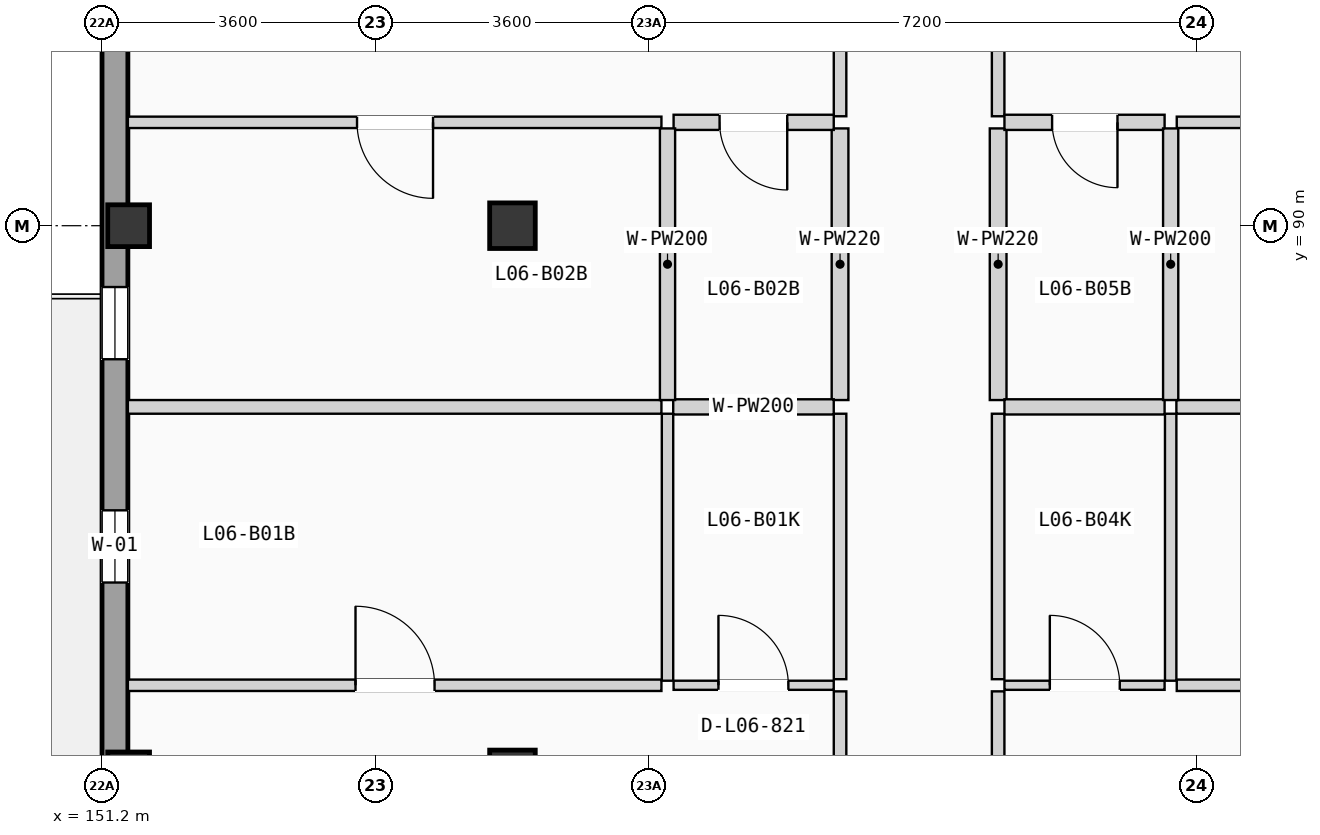
"""IFC4 building model, lengths in metres.
Left out: names, types, materials, properties, quantities, classifications, styles, units other than length and angle.
Written with IfcOpenShell. Run it as: python <this file> out.ifc"""

import sys

from ifc_helpers import new_model, si_unit, direction, frame, frame_2d, origin, origin_2d, place, context, subcontext, project, spatial, rectangle, extrude, element, fill, save


model = new_model("IFC4")
c1 = context("Model", 3, precision=1e-05, world=origin(), true_north=direction((0.0, 1.0)))
c2 = subcontext(c1, "Body", "Model", "MODEL_VIEW")
j1 = project(units=[si_unit("LENGTHUNIT", "METRE"), si_unit("PLANEANGLEUNIT", "RADIAN")], contexts=[c1])
p1 = place(None, origin())
s1 = spatial("IfcSite", under=j1, at=p1, CompositionType="ELEMENT")
p2 = place(p1, origin())
s2 = spatial("IfcBuilding", under=s1, at=p2, CompositionType="ELEMENT")
p3 = place(p2, frame((0.0, 0.0, 21.525)))
s3 = spatial("IfcBuildingStorey", under=s2, at=p3, CompositionType="ELEMENT", Elevation=21.525)
for number, where, z_axis, x_axis in (
    (1, (151.55, 82.8, 0.0), (0.0, 0.0, 1.0), (1.0, 0.0, 0.0)),
    (2, (151.55, 90.0, 0.0), (0.0, 0.0, 1.0), (1.0, 0.0, 0.0)),
):
    element("IfcColumn", number, at=place(p3, frame(where, z_axis=z_axis, x_axis=x_axis)), inside=s3, PredefinedType="COLUMN", context=c2, shape_type="SweptSolid", body=[
        extrude(rectangle(XDim=0.55, YDim=0.55, at=origin_2d()), origin(), (0.0, 0.0, 1.0), 3.15),
    ])
for number, where, z_axis, x_axis in (
    (3, (156.6, 82.8, 0.0), (0.0, 0.0, 1.0), (1.0, 0.0, 0.0)),
    (4, (156.6, 90.0, 0.0), (0.0, 0.0, 1.0), (1.0, 0.0, 0.0)),
):
    element("IfcColumn", number, at=place(p3, frame(where, z_axis=z_axis, x_axis=x_axis)), inside=s3, PredefinedType="COLUMN", context=c2, shape_type="SweptSolid", body=[
        extrude(rectangle(XDim=0.6, YDim=0.6, at=origin_2d()), origin(), (0.0, 0.0, 1.0), 3.15),
    ])
p4 = place(p3, frame((151.37, 68.74, 0.0), z_axis=(0.0, 0.0, 1.0), x_axis=(0.0, 1.0, 0.0)))
e5 = element("IfcWall", 5, at=p4, inside=s3, PredefinedType="SOLIDWALL", context=c2, shape_type="SweptSolid", body=[
    extrude(rectangle(XDim=49.72, YDim=0.34, at=frame_2d((24.86, 0.0))), origin(), (0.0, 0.0, 1.0), 2.89),
])
p5 = place(p4, frame((11.462, 0.0, 0.0)))
e6 = element("IfcOpeningElement", 6, at=p5, cuts=e5, PredefinedType="OPENING", context=c2, shape_type="SweptSolid", body=[
    extrude(rectangle(XDim=0.95, YDim=2.15, at=frame_2d((0.475, 1.075))), frame((0.0, 0.18, 0.0), z_axis=(0.0, -1.0, 0.0), x_axis=(1.0, 0.0, 0.0)), (0.0, 0.0, 1.0), 0.36),
])
p6 = place(p4, frame((8.082, 0.0, 0.555)))
e7 = element("IfcOpeningElement", 7, at=p6, cuts=e5, PredefinedType="OPENING", context=c2, shape_type="SweptSolid", body=[
    extrude(rectangle(XDim=1.85, YDim=1.65, at=frame_2d((0.925, 0.825))), frame((0.0, 0.18, 0.0), z_axis=(0.0, -1.0, 0.0), x_axis=(1.0, 0.0, 0.0)), (0.0, 0.0, 1.0), 0.36),
])
p7 = place(p4, frame((16.565, 0.0, 0.85)))
e8 = element("IfcOpeningElement", 8, at=p7, cuts=e5, PredefinedType="OPENING", context=c2, shape_type="SweptSolid", body=[
    extrude(rectangle(XDim=0.95, YDim=1.2, at=frame_2d((0.475, 0.6))), frame((0.0, 0.18, 0.0), z_axis=(0.0, -1.0, 0.0), x_axis=(1.0, 0.0, 0.0)), (0.0, 0.0, 1.0), 0.36),
])
p8 = place(p4, frame((23.86, 0.0, 0.9)))
e9 = element("IfcOpeningElement", 9, at=p8, cuts=e5, PredefinedType="OPENING", context=c2, shape_type="SweptSolid", body=[
    extrude(rectangle(XDim=2.0, YDim=1.2, at=frame_2d((1.0, 0.6))), frame((0.0, 0.18, 0.0), z_axis=(0.0, -1.0, 0.0), x_axis=(1.0, 0.0, 0.0)), (0.0, 0.0, 1.0), 0.36),
])
p9 = place(p4, frame((19.503, 0.0, 0.85)))
e10 = element("IfcOpeningElement", 10, at=p9, cuts=e5, PredefinedType="OPENING", context=c2, shape_type="SweptSolid", body=[
    extrude(rectangle(XDim=0.95, YDim=1.2, at=frame_2d((0.475, 0.6))), frame((0.0, 0.18, 0.0), z_axis=(0.0, -1.0, 0.0), x_axis=(1.0, 0.0, 0.0)), (0.0, 0.0, 1.0), 0.36),
])
p10 = place(p4, frame((29.267, 0.0, 0.85)))
e11 = element("IfcOpeningElement", 11, at=p10, cuts=e5, PredefinedType="OPENING", context=c2, shape_type="SweptSolid", body=[
    extrude(rectangle(XDim=0.95, YDim=1.2, at=frame_2d((0.475, 0.6))), frame((0.0, 0.18, 0.0), z_axis=(0.0, -1.0, 0.0), x_axis=(1.0, 0.0, 0.0)), (0.0, 0.0, 1.0), 0.36),
])
p11 = place(p4, frame((37.243, 0.0, 0.0)))
e12 = element("IfcOpeningElement", 12, at=p11, cuts=e5, PredefinedType="OPENING", context=c2, shape_type="SweptSolid", body=[
    extrude(rectangle(XDim=1.08, YDim=2.18, at=frame_2d((0.54, 1.09))), frame((0.0, 0.18, 0.0), z_axis=(0.0, -1.0, 0.0), x_axis=(1.0, 0.0, 0.0)), (0.0, 0.0, 1.0), 0.36),
])
p12 = place(p4, frame((31.681, 0.0, 0.555)))
e13 = element("IfcOpeningElement", 13, at=p12, cuts=e5, PredefinedType="OPENING", context=c2, shape_type="SweptSolid", body=[
    extrude(rectangle(XDim=2.0, YDim=1.65, at=frame_2d((1.0, 0.825))), frame((0.0, 0.18, 0.0), z_axis=(0.0, -1.0, 0.0), x_axis=(1.0, 0.0, 0.0)), (0.0, 0.0, 1.0), 0.36),
])
p13 = place(p4, frame((40.239, 0.0, 0.85)))
e14 = element("IfcOpeningElement", 14, at=p13, cuts=e5, PredefinedType="OPENING", context=c2, shape_type="SweptSolid", body=[
    extrude(rectangle(XDim=0.95, YDim=1.2, at=frame_2d((0.475, 0.6))), frame((0.0, 0.18, 0.0), z_axis=(0.0, -1.0, 0.0), x_axis=(1.0, 0.0, 0.0)), (0.0, 0.0, 1.0), 0.36),
])
p14 = place(p3, frame((160.91, 79.653, 0.0), z_axis=(0.0, 0.0, 1.0), x_axis=(0.0, 1.0, 0.0)))
e15 = element("IfcWall", 15, at=p14, inside=s3, PredefinedType="PARTITIONING", context=c2, shape_type="SweptSolid", body=[
    extrude(rectangle(XDim=4.22, YDim=0.165, at=frame_2d((2.11, 0.0))), origin(), (0.0, 0.0, 1.0), 2.87),
])
p15 = place(p14, frame((1.605, 0.0, 0.0)))
e16 = element("IfcOpeningElement", 16, at=p15, cuts=e15, PredefinedType="OPENING", context=c2, shape_type="SweptSolid", body=[
    extrude(rectangle(XDim=1.01, YDim=2.11, at=frame_2d((0.505, 1.055))), frame((0.0, 0.093, 0.0), z_axis=(0.0, -1.0, 0.0), x_axis=(1.0, 0.0, 0.0)), (0.0, 0.0, 1.0), 0.185),
])
p16 = place(p3, frame((160.91, 84.033, 0.0), z_axis=(0.0, 0.0, 1.0), x_axis=(0.0, 1.0, 0.0)))
e17 = element("IfcWall", 17, at=p16, inside=s3, PredefinedType="PARTITIONING", context=c2, shape_type="SweptSolid", body=[
    extrude(rectangle(XDim=3.493, YDim=0.165, at=frame_2d((1.747, 0.0))), origin(), (0.0, 0.0, 1.0), 2.87),
])
p17 = place(p3, frame((160.91, 91.44, 0.0), z_axis=(0.0, 0.0, 1.0), x_axis=(0.0, 1.0, 0.0)))
e18 = element("IfcWall", 18, at=p17, inside=s3, PredefinedType="PARTITIONING", context=c2, shape_type="SweptSolid", body=[
    extrude(rectangle(XDim=4.32, YDim=0.165, at=frame_2d((2.16, 0.0))), origin(), (0.0, 0.0, 1.0), 2.87),
])
p18 = place(p17, frame((1.655, 0.0, 0.0)))
e19 = element("IfcOpeningElement", 19, at=p18, cuts=e18, PredefinedType="OPENING", context=c2, shape_type="SweptSolid", body=[
    extrude(rectangle(XDim=1.01, YDim=2.11, at=frame_2d((0.505, 1.055))), frame((0.0, 0.093, 0.0), z_axis=(0.0, -1.0, 0.0), x_axis=(1.0, 0.0, 0.0)), (0.0, 0.0, 1.0), 0.185),
])
p19 = place(p3, frame((160.91, 87.706, 0.0), z_axis=(0.0, 0.0, 1.0), x_axis=(0.0, 1.0, 0.0)))
e20 = element("IfcWall", 20, at=p19, inside=s3, PredefinedType="PLUMBINGWALL", context=c2, shape_type="SweptSolid", body=[
    extrude(rectangle(XDim=3.574, YDim=0.22, at=frame_2d((1.787, 0.0))), origin(), (0.0, 0.0, 1.0), 2.87),
])
p20 = place(p3, frame((162.99, 79.653, 0.0), z_axis=(0.0, 0.0, 1.0), x_axis=(0.0, 1.0, 0.0)))
e21 = element("IfcWall", 21, at=p20, inside=s3, PredefinedType="PARTITIONING", context=c2, shape_type="SweptSolid", body=[
    extrude(rectangle(XDim=4.22, YDim=0.165, at=frame_2d((2.11, 0.0))), origin(), (0.0, 0.0, 1.0), 2.87),
])
p21 = place(p20, frame((1.605, 0.0, 0.0)))
e22 = element("IfcOpeningElement", 22, at=p21, cuts=e21, PredefinedType="OPENING", context=c2, shape_type="SweptSolid", body=[
    extrude(rectangle(XDim=1.01, YDim=2.11, at=frame_2d((0.505, 1.055))), frame((0.0, 0.093, 0.0), z_axis=(0.0, -1.0, 0.0), x_axis=(1.0, 0.0, 0.0)), (0.0, 0.0, 1.0), 0.185),
])
p22 = place(p3, frame((162.99, 84.033, 0.0), z_axis=(0.0, 0.0, 1.0), x_axis=(0.0, 1.0, 0.0)))
e23 = element("IfcWall", 23, at=p22, inside=s3, PredefinedType="PARTITIONING", context=c2, shape_type="SweptSolid", body=[
    extrude(rectangle(XDim=3.493, YDim=0.165, at=frame_2d((1.747, 0.0))), origin(), (0.0, 0.0, 1.0), 2.87),
])
p23 = place(p3, frame((162.99, 91.44, 0.0), z_axis=(0.0, 0.0, 1.0), x_axis=(0.0, 1.0, 0.0)))
e24 = element("IfcWall", 24, at=p23, inside=s3, PredefinedType="PARTITIONING", context=c2, shape_type="SweptSolid", body=[
    extrude(rectangle(XDim=4.32, YDim=0.165, at=frame_2d((2.16, 0.0))), origin(), (0.0, 0.0, 1.0), 2.87),
])
p24 = place(p23, frame((1.655, 0.0, 0.0)))
e25 = element("IfcOpeningElement", 25, at=p24, cuts=e24, PredefinedType="OPENING", context=c2, shape_type="SweptSolid", body=[
    extrude(rectangle(XDim=1.01, YDim=2.11, at=frame_2d((0.505, 1.055))), frame((0.0, 0.093, 0.0), z_axis=(0.0, -1.0, 0.0), x_axis=(1.0, 0.0, 0.0)), (0.0, 0.0, 1.0), 0.185),
])
p25 = place(p3, frame((162.99, 87.706, 0.0), z_axis=(0.0, 0.0, 1.0), x_axis=(0.0, 1.0, 0.0)))
e26 = element("IfcWall", 26, at=p25, inside=s3, PredefinedType="PLUMBINGWALL", context=c2, shape_type="SweptSolid", body=[
    extrude(rectangle(XDim=3.574, YDim=0.22, at=frame_2d((1.787, 0.0))), origin(), (0.0, 0.0, 1.0), 2.87),
])
p26 = place(p3, frame((158.72, 83.953, 0.0), z_axis=(0.0, 0.0, 1.0), x_axis=(1.0, 0.0, 0.0)))
e27 = element("IfcWall", 27, at=p26, inside=s3, PredefinedType="PARTITIONING", context=c2, shape_type="SweptSolid", body=[
    extrude(rectangle(XDim=2.107, YDim=0.12, at=frame_2d((1.053, 0.0))), origin(), (0.0, 0.0, 1.0), 2.87),
])
p27 = place(p26, frame((0.59, 0.0, 0.0)))
e28 = element("IfcOpeningElement", 28, at=p27, cuts=e27, PredefinedType="OPENING", context=c2, shape_type="SweptSolid", body=[
    extrude(rectangle(XDim=0.92, YDim=2.02, at=frame_2d((0.46, 1.01))), frame((0.0, 0.07, 0.0), z_axis=(0.0, -1.0, 0.0), x_axis=(1.0, 0.0, 0.0)), (0.0, 0.0, 1.0), 0.14),
])
p28 = place(p3, frame((151.54, 83.953, 0.0), z_axis=(0.0, 0.0, 1.0), x_axis=(1.0, 0.0, 0.0)))
e29 = element("IfcWall", 29, at=p28, inside=s3, PredefinedType="PARTITIONING", context=c2, shape_type="SweptSolid", body=[
    extrude(rectangle(XDim=7.02, YDim=0.15, at=frame_2d((3.51, 0.0))), origin(), (0.0, 0.0, 1.0), 2.87),
])
p29 = place(p28, frame((2.995, 0.0, 0.0)))
e30 = element("IfcOpeningElement", 30, at=p29, cuts=e29, PredefinedType="OPENING", context=c2, shape_type="SweptSolid", body=[
    extrude(rectangle(XDim=1.04, YDim=2.08, at=frame_2d((0.52, 1.04))), frame((0.0, 0.085, 0.0), z_axis=(0.0, -1.0, 0.0), x_axis=(1.0, 0.0, 0.0)), (0.0, 0.0, 1.0), 0.17),
])
p30 = place(p3, frame((158.64, 84.013, 0.0), z_axis=(0.0, 0.0, 1.0), x_axis=(0.0, 1.0, 0.0)))
e31 = element("IfcWall", 31, at=p30, inside=s3, PredefinedType="PARTITIONING", context=c2, shape_type="SweptSolid", body=[
    extrude(rectangle(XDim=3.513, YDim=0.15, at=frame_2d((1.756, 0.0))), origin(), (0.0, 0.0, 1.0), 2.87),
])
p31 = place(p3, frame((158.715, 87.616, 0.0), z_axis=(0.0, 0.0, 1.0), x_axis=(1.0, 0.0, 0.0)))
e32 = element("IfcWall", 32, at=p31, inside=s3, PredefinedType="PLUMBINGWALL", context=c2, shape_type="SweptSolid", body=[
    extrude(rectangle(XDim=2.112, YDim=0.2, at=frame_2d((1.056, 0.0))), origin(), (0.0, 0.0, 1.0), 2.87),
])
p32 = place(p3, frame((151.54, 87.616, 0.0), z_axis=(0.0, 0.0, 1.0), x_axis=(1.0, 0.0, 0.0)))
e33 = element("IfcWall", 33, at=p32, inside=s3, PredefinedType="PARTITIONING", context=c2, shape_type="SweptSolid", body=[
    extrude(rectangle(XDim=7.02, YDim=0.18, at=frame_2d((3.51, 0.0))), origin(), (0.0, 0.0, 1.0), 2.87),
])
p33 = place(p3, frame((158.72, 91.36, 0.0), z_axis=(0.0, 0.0, 1.0), x_axis=(1.0, 0.0, 0.0)))
e34 = element("IfcWall", 34, at=p33, inside=s3, PredefinedType="PLUMBINGWALL", context=c2, shape_type="SweptSolid", body=[
    extrude(rectangle(XDim=2.107, YDim=0.2, at=frame_2d((1.053, 0.0))), origin(), (0.0, 0.0, 1.0), 2.87),
])
p34 = place(p33, frame((0.605, 0.0, 0.0)))
e35 = element("IfcOpeningElement", 35, at=p34, cuts=e34, PredefinedType="OPENING", context=c2, shape_type="SweptSolid", body=[
    extrude(rectangle(XDim=0.89, YDim=2.03, at=frame_2d((0.445, 1.015))), frame((0.0, 0.11, 0.0), z_axis=(0.0, -1.0, 0.0), x_axis=(1.0, 0.0, 0.0)), (0.0, 0.0, 1.0), 0.22),
])
p35 = place(p3, frame((151.54, 91.36, 0.0), z_axis=(0.0, 0.0, 1.0), x_axis=(1.0, 0.0, 0.0)))
e36 = element("IfcWall", 36, at=p35, inside=s3, PredefinedType="PARTITIONING", context=c2, shape_type="SweptSolid", body=[
    extrude(rectangle(XDim=7.02, YDim=0.15, at=frame_2d((3.51, 0.0))), origin(), (0.0, 0.0, 1.0), 2.87),
])
p36 = place(p35, frame((3.015, 0.0, 0.0)))
e37 = element("IfcOpeningElement", 37, at=p36, cuts=e36, PredefinedType="OPENING", context=c2, shape_type="SweptSolid", body=[
    extrude(rectangle(XDim=1.0, YDim=2.06, at=frame_2d((0.5, 1.03))), frame((0.0, 0.085, 0.0), z_axis=(0.0, -1.0, 0.0), x_axis=(1.0, 0.0, 0.0)), (0.0, 0.0, 1.0), 0.17),
])
p37 = place(p3, frame((158.64, 87.706, 0.0), z_axis=(0.0, 0.0, 1.0), x_axis=(0.0, 1.0, 0.0)))
e38 = element("IfcWall", 38, at=p37, inside=s3, PredefinedType="PLUMBINGWALL", context=c2, shape_type="SweptSolid", body=[
    extrude(rectangle(XDim=3.574, YDim=0.2, at=frame_2d((1.787, 0.0))), origin(), (0.0, 0.0, 1.0), 2.87),
])
p38 = place(p3, frame((163.073, 83.953, 0.0), z_axis=(0.0, 0.0, 1.0), x_axis=(1.0, 0.0, 0.0)))
e39 = element("IfcWall", 39, at=p38, inside=s3, PredefinedType="PARTITIONING", context=c2, shape_type="SweptSolid", body=[
    extrude(rectangle(XDim=2.107, YDim=0.12, at=frame_2d((1.053, 0.0))), origin(), (0.0, 0.0, 1.0), 2.87),
])
p39 = place(p38, frame((0.597, 0.0, 0.0)))
e40 = element("IfcOpeningElement", 40, at=p39, cuts=e39, PredefinedType="OPENING", context=c2, shape_type="SweptSolid", body=[
    extrude(rectangle(XDim=0.92, YDim=2.02, at=frame_2d((0.46, 1.01))), frame((0.0, 0.07, 0.0), z_axis=(0.0, -1.0, 0.0), x_axis=(1.0, 0.0, 0.0)), (0.0, 0.0, 1.0), 0.14),
])
p40 = place(p3, frame((165.34, 83.953, 0.0), z_axis=(0.0, 0.0, 1.0), x_axis=(1.0, 0.0, 0.0)))
e41 = element("IfcWall", 41, at=p40, inside=s3, PredefinedType="PARTITIONING", context=c2, shape_type="SweptSolid", body=[
    extrude(rectangle(XDim=7.12, YDim=0.15, at=frame_2d((3.56, 0.0))), origin(), (0.0, 0.0, 1.0), 2.87),
])
p41 = place(p40, frame((3.035, 0.0, 0.0)))
e42 = element("IfcOpeningElement", 42, at=p41, cuts=e41, PredefinedType="OPENING", context=c2, shape_type="SweptSolid", body=[
    extrude(rectangle(XDim=1.04, YDim=2.08, at=frame_2d((0.52, 1.04))), frame((0.0, 0.085, 0.0), z_axis=(0.0, -1.0, 0.0), x_axis=(1.0, 0.0, 0.0)), (0.0, 0.0, 1.0), 0.17),
])
p42 = place(p3, frame((165.26, 84.013, 0.0), z_axis=(0.0, 0.0, 1.0), x_axis=(0.0, 1.0, 0.0)))
e43 = element("IfcWall", 43, at=p42, inside=s3, PredefinedType="PARTITIONING", context=c2, shape_type="SweptSolid", body=[
    extrude(rectangle(XDim=3.513, YDim=0.15, at=frame_2d((1.756, 0.0))), origin(), (0.0, 0.0, 1.0), 2.87),
])
p43 = place(p3, frame((163.073, 87.616, 0.0), z_axis=(0.0, 0.0, 1.0), x_axis=(1.0, 0.0, 0.0)))
e44 = element("IfcWall", 44, at=p43, inside=s3, PredefinedType="PLUMBINGWALL", context=c2, shape_type="SweptSolid", body=[
    extrude(rectangle(XDim=2.107, YDim=0.2, at=frame_2d((1.053, 0.0))), origin(), (0.0, 0.0, 1.0), 2.87),
])
p44 = place(p3, frame((165.335, 87.616, 0.0), z_axis=(0.0, 0.0, 1.0), x_axis=(1.0, 0.0, 0.0)))
e45 = element("IfcWall", 45, at=p44, inside=s3, PredefinedType="PARTITIONING", context=c2, shape_type="SweptSolid", body=[
    extrude(rectangle(XDim=7.125, YDim=0.18, at=frame_2d((3.562, 0.0))), origin(), (0.0, 0.0, 1.0), 2.87),
])
p45 = place(p3, frame((163.073, 91.36, 0.0), z_axis=(0.0, 0.0, 1.0), x_axis=(1.0, 0.0, 0.0)))
e46 = element("IfcWall", 46, at=p45, inside=s3, PredefinedType="PLUMBINGWALL", context=c2, shape_type="SweptSolid", body=[
    extrude(rectangle(XDim=2.107, YDim=0.2, at=frame_2d((1.053, 0.0))), origin(), (0.0, 0.0, 1.0), 2.87),
])
p46 = place(p45, frame((0.627, 0.0, 0.0)))
e47 = element("IfcOpeningElement", 47, at=p46, cuts=e46, PredefinedType="OPENING", context=c2, shape_type="SweptSolid", body=[
    extrude(rectangle(XDim=0.86, YDim=2.0, at=frame_2d((0.43, 1.0))), frame((0.0, 0.11, 0.0), z_axis=(0.0, -1.0, 0.0), x_axis=(1.0, 0.0, 0.0)), (0.0, 0.0, 1.0), 0.22),
])
p47 = place(p3, frame((165.34, 91.36, 0.0), z_axis=(0.0, 0.0, 1.0), x_axis=(1.0, 0.0, 0.0)))
e48 = element("IfcWall", 48, at=p47, inside=s3, PredefinedType="PARTITIONING", context=c2, shape_type="SweptSolid", body=[
    extrude(rectangle(XDim=7.12, YDim=0.15, at=frame_2d((3.56, 0.0))), origin(), (0.0, 0.0, 1.0), 2.87),
])
p48 = place(p47, frame((3.055, 0.0, 0.0)))
e49 = element("IfcOpeningElement", 49, at=p48, cuts=e48, PredefinedType="OPENING", context=c2, shape_type="SweptSolid", body=[
    extrude(rectangle(XDim=1.0, YDim=2.06, at=frame_2d((0.5, 1.03))), frame((0.0, 0.085, 0.0), z_axis=(0.0, -1.0, 0.0), x_axis=(1.0, 0.0, 0.0)), (0.0, 0.0, 1.0), 0.17),
])
p49 = place(p3, frame((165.26, 87.706, 0.0), z_axis=(0.0, 0.0, 1.0), x_axis=(0.0, 1.0, 0.0)))
e50 = element("IfcWall", 50, at=p49, inside=s3, PredefinedType="PLUMBINGWALL", context=c2, shape_type="SweptSolid", body=[
    extrude(rectangle(XDim=3.574, YDim=0.2, at=frame_2d((1.787, 0.0))), origin(), (0.0, 0.0, 1.0), 2.87),
])
p50 = place(p7, origin())
e51 = element("IfcWindow", 51, at=p50, inside=s3, PartitioningType="SINGLE_PANEL", PredefinedType="WINDOW", context=c2, shape_type="SweptSolid", body=[
    extrude(rectangle(XDim=0.95, YDim=1.2, at=frame_2d((0.475, 0.6))), frame((0.0, 0.03, 0.0), z_axis=(0.0, -1.0, 0.0), x_axis=(1.0, 0.0, 0.0)), (0.0, 0.0, 1.0), 0.06),
])
fill(e8, e51)
p51 = place(p9, origin())
e52 = element("IfcWindow", 52, at=p51, inside=s3, PartitioningType="SINGLE_PANEL", PredefinedType="WINDOW", context=c2, shape_type="SweptSolid", body=[
    extrude(rectangle(XDim=0.95, YDim=1.2, at=frame_2d((0.475, 0.6))), frame((0.0, 0.03, 0.0), z_axis=(0.0, -1.0, 0.0), x_axis=(1.0, 0.0, 0.0)), (0.0, 0.0, 1.0), 0.06),
])
fill(e10, e52)
p52 = place(p27, origin())
e53 = element("IfcDoor", 53, at=p52, inside=s3, OperationType="SINGLE_SWING_LEFT", PredefinedType="DOOR", context=c2, shape_type="SweptSolid", body=[
    extrude(rectangle(XDim=0.92, YDim=2.02, at=frame_2d((0.46, 1.01))), frame((0.0, 0.025, 0.0), z_axis=(0.0, -1.0, 0.0), x_axis=(1.0, 0.0, 0.0)), (0.0, 0.0, 1.0), 0.05),
])
fill(e28, e53)
p53 = place(p29, origin())
e54 = element("IfcDoor", 54, at=p53, inside=s3, OperationType="SINGLE_SWING_LEFT", PredefinedType="DOOR", context=c2, shape_type="SweptSolid", body=[
    extrude(rectangle(XDim=1.04, YDim=2.08, at=frame_2d((0.52, 1.04))), frame((0.0, 0.025, 0.0), z_axis=(0.0, -1.0, 0.0), x_axis=(1.0, 0.0, 0.0)), (0.0, 0.0, 1.0), 0.05),
])
fill(e30, e54)
p54 = place(p34, frame((0.89, 0.0, 0.0), z_axis=(0.0, 0.0, 1.0), x_axis=(-1.0, 0.0, 0.0)))
e55 = element("IfcDoor", 55, at=p54, inside=s3, OperationType="SINGLE_SWING_RIGHT", PredefinedType="DOOR", context=c2, shape_type="SweptSolid", body=[
    extrude(rectangle(XDim=0.89, YDim=2.03, at=frame_2d((0.445, 1.015))), frame((0.0, 0.025, 0.0), z_axis=(0.0, -1.0, 0.0), x_axis=(1.0, 0.0, 0.0)), (0.0, 0.0, 1.0), 0.05),
])
fill(e35, e55)
p55 = place(p36, frame((1.0, 0.0, 0.0), z_axis=(0.0, 0.0, 1.0), x_axis=(-1.0, 0.0, 0.0)))
e56 = element("IfcDoor", 56, at=p55, inside=s3, OperationType="SINGLE_SWING_RIGHT", PredefinedType="DOOR", context=c2, shape_type="SweptSolid", body=[
    extrude(rectangle(XDim=1.0, YDim=2.06, at=frame_2d((0.5, 1.03))), frame((0.0, 0.025, 0.0), z_axis=(0.0, -1.0, 0.0), x_axis=(1.0, 0.0, 0.0)), (0.0, 0.0, 1.0), 0.05),
])
fill(e37, e56)
p56 = place(p39, origin())
e57 = element("IfcDoor", 57, at=p56, inside=s3, OperationType="SINGLE_SWING_LEFT", PredefinedType="DOOR", context=c2, shape_type="SweptSolid", body=[
    extrude(rectangle(XDim=0.92, YDim=2.02, at=frame_2d((0.46, 1.01))), frame((0.0, 0.025, 0.0), z_axis=(0.0, -1.0, 0.0), x_axis=(1.0, 0.0, 0.0)), (0.0, 0.0, 1.0), 0.05),
])
fill(e40, e57)
p57 = place(p46, frame((0.86, 0.0, 0.0), z_axis=(0.0, 0.0, 1.0), x_axis=(-1.0, 0.0, 0.0)))
e58 = element("IfcDoor", 58, at=p57, inside=s3, OperationType="SINGLE_SWING_RIGHT", PredefinedType="DOOR", context=c2, shape_type="SweptSolid", body=[
    extrude(rectangle(XDim=0.86, YDim=2.0, at=frame_2d((0.43, 1.0))), frame((0.0, 0.025, 0.0), z_axis=(0.0, -1.0, 0.0), x_axis=(1.0, 0.0, 0.0)), (0.0, 0.0, 1.0), 0.05),
])
fill(e47, e58)
save(model, sys.argv[1])
